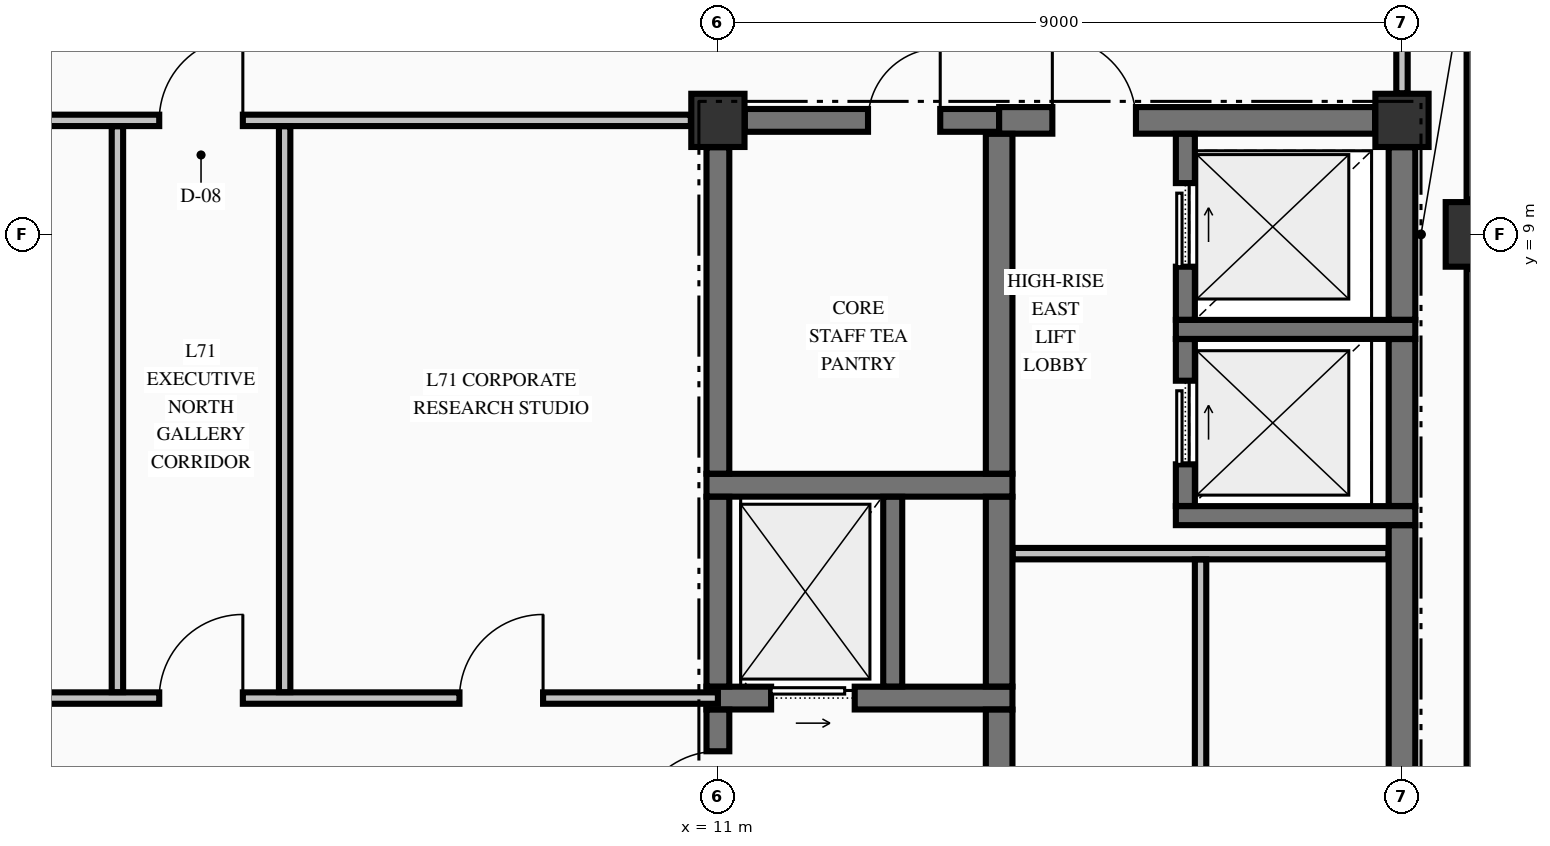
"""IFC4 building model, lengths in metres.
Left out: names, types, materials, properties, quantities, classifications, styles, units other than length and angle.
Written with IfcOpenShell. Run it as: python <this file> out.ifc"""

import sys

from ifc_helpers import new_model, si_unit, direction, frame, frame_2d, origin, origin_2d, place, context, subcontext, project, spatial, rectangle, extrude, element, fill, save


model = new_model("IFC4")
c1 = context("Model", 3, precision=1e-05, world=origin(), true_north=direction((0.0, 1.0)))
c2 = subcontext(c1, "Body", "Model", "MODEL_VIEW")
j1 = project(units=[si_unit("LENGTHUNIT", "METRE"), si_unit("PLANEANGLEUNIT", "RADIAN")], contexts=[c1])
p1 = place(None, origin())
s1 = spatial("IfcSite", under=j1, at=p1, CompositionType="ELEMENT")
p2 = place(p1, origin())
s2 = spatial("IfcBuilding", under=s1, at=p2, CompositionType="ELEMENT")
p3 = place(p2, frame((0.0, 0.0, 267.35)))
s3 = spatial("IfcBuildingStorey", under=s2, at=p3, CompositionType="ELEMENT", Elevation=267.35)
p4 = place(p3, frame((21.0, 9.0, -0.25), z_axis=(0.0, 0.0, 1.0), x_axis=(1.0, 0.0, 0.0)))
e1 = element("IfcColumn", 1, at=p4, inside=s3, PredefinedType="COLUMN", context=c2, shape_type="SweptSolid", body=[
    extrude(rectangle(XDim=0.85, YDim=0.85, at=origin_2d()), origin(), (0.0, 0.0, 1.0), 3.155),
])
for number, where, z_axis, x_axis in (
    (2, (11.0, 10.5, -0.25), (0.0, 0.0, 1.0), (1.0, 0.0, 0.0)),
    (3, (20.0, 10.5, -0.25), (0.0, 0.0, 1.0), (1.0, 0.0, 0.0)),
):
    element("IfcColumn", number, at=place(p3, frame(where, z_axis=z_axis, x_axis=x_axis)), inside=s3, PredefinedType="COLUMN", context=c2, shape_type="SweptSolid", body=[
        extrude(rectangle(XDim=0.7, YDim=0.7, at=origin_2d()), origin(), (0.0, 0.0, 1.0), 3.155),
    ])
for number, where, z_axis, x_axis in (
    (4, (21.0, 0.455, 0.0), (0.0, 0.0, 1.0), (0.0, 1.0, 0.0)),
    (5, (21.0, 9.455, 0.0), (0.0, 0.0, 1.0), (0.0, 1.0, 0.0)),
):
    element("IfcWall", number, at=place(p3, frame(where, z_axis=z_axis, x_axis=x_axis)), inside=s3, PredefinedType="STANDARD", context=c2, shape_type="SweptSolid", body=[
        extrude(rectangle(XDim=8.09, YDim=0.3, at=frame_2d((4.045, 0.0))), origin(), (0.0, 0.0, 1.0), 2.297),
    ])
p5 = place(p3, frame((10.85, 2.9, 0.0), z_axis=(0.0, 0.0, 1.0), x_axis=(1.0, 0.0, 0.0)))
e6 = element("IfcWall", 6, at=p5, inside=s3, PredefinedType="SHEAR", context=c2, shape_type="SweptSolid", body=[
    extrude(rectangle(XDim=4.025, YDim=0.3, at=frame_2d((2.012, 0.0))), origin(), (0.0, 0.0, 1.0), 2.905),
])
p6 = place(p5, frame((0.85, 0.0, 0.0)))
e7 = element("IfcOpeningElement", 7, at=p6, cuts=e6, PredefinedType="OPENING", context=c2, shape_type="SweptSolid", body=[
    extrude(rectangle(XDim=1.1, YDim=2.2, at=frame_2d((0.55, 1.1))), frame((0.0, 0.16, 0.0), z_axis=(0.0, -1.0, 0.0), x_axis=(1.0, 0.0, 0.0)), (0.0, 0.0, 1.0), 0.32),
])
p7 = place(p3, frame((17.025, 5.3, 0.0), z_axis=(0.0, 0.0, 1.0), x_axis=(1.0, 0.0, 0.0)))
e8 = element("IfcWall", 8, at=p7, inside=s3, PredefinedType="SOLIDWALL", context=c2, shape_type="SweptSolid", body=[
    extrude(rectangle(XDim=3.15, YDim=0.25, at=frame_2d((1.575, 0.0))), origin(), (0.0, 0.0, 1.0), 2.905),
])
p8 = place(p3, frame((10.85, 5.7, 0.0), z_axis=(0.0, 0.0, 1.0), x_axis=(1.0, 0.0, 0.0)))
e9 = element("IfcWall", 9, at=p8, inside=s3, PredefinedType="SHEAR", context=c2, shape_type="SweptSolid", body=[
    extrude(rectangle(XDim=4.025, YDim=0.3, at=frame_2d((2.012, 0.0))), origin(), (0.0, 0.0, 1.0), 2.905),
])
p9 = place(p3, frame((17.025, 7.75, 0.0), z_axis=(0.0, 0.0, 1.0), x_axis=(1.0, 0.0, 0.0)))
e10 = element("IfcWall", 10, at=p9, inside=s3, PredefinedType="SOLIDWALL", context=c2, shape_type="SweptSolid", body=[
    extrude(rectangle(XDim=3.15, YDim=0.25, at=frame_2d((1.575, 0.0))), origin(), (0.0, 0.0, 1.0), 2.905),
])
p10 = place(p3, frame((11.354, 10.5, 0.0), z_axis=(0.0, 0.0, 1.0), x_axis=(1.0, 0.0, 0.0)))
e11 = element("IfcWall", 11, at=p10, inside=s3, PredefinedType="SHEAR", context=c2, shape_type="SweptSolid", body=[
    extrude(rectangle(XDim=3.346, YDim=0.3, at=frame_2d((1.673, 0.0))), origin(), (0.0, 0.0, 1.0), 2.905),
])
p11 = place(p10, frame((1.621, 0.0, 0.0)))
e12 = element("IfcOpeningElement", 12, at=p11, cuts=e11, PredefinedType="OPENING", context=c2, shape_type="SweptSolid", body=[
    extrude(rectangle(XDim=0.95, YDim=2.15, at=frame_2d((0.475, 1.075))), frame((0.0, 0.16, 0.0), z_axis=(0.0, -1.0, 0.0), x_axis=(1.0, 0.0, 0.0)), (0.0, 0.0, 1.0), 0.32),
])
p12 = place(p3, frame((14.7, 10.5, 0.0), z_axis=(0.0, 0.0, 1.0), x_axis=(1.0, 0.0, 0.0)))
e13 = element("IfcWall", 13, at=p12, inside=s3, PredefinedType="SHEAR", context=c2, shape_type="SweptSolid", body=[
    extrude(rectangle(XDim=4.946, YDim=0.35, at=frame_2d((2.473, 0.0))), origin(), (0.0, 0.0, 1.0), 2.905),
])
p13 = place(p12, frame((0.7, 0.0, 0.0)))
e14 = element("IfcOpeningElement", 14, at=p13, cuts=e13, PredefinedType="OPENING", context=c2, shape_type="SweptSolid", body=[
    extrude(rectangle(XDim=1.1, YDim=2.15, at=frame_2d((0.55, 1.075))), frame((0.0, 0.185, 0.0), z_axis=(0.0, -1.0, 0.0), x_axis=(1.0, 0.0, 0.0)), (0.0, 0.0, 1.0), 0.37),
])
p14 = place(p3, frame((-11.0, 2.9, 0.0), z_axis=(0.0, 0.0, 1.0), x_axis=(1.0, 0.0, 0.0)))
e15 = element("IfcWall", 15, at=p14, inside=s3, PredefinedType="PARTITIONING", context=c2, shape_type="SweptSolid", body=[
    extrude(rectangle(XDim=22.0, YDim=0.15, at=frame_2d((11.0, 0.0))), origin(), (0.0, 0.0, 1.0), 2.905),
])
p15 = place(p14, frame((14.65, 0.0, 0.0)))
e16 = element("IfcOpeningElement", 16, at=p15, cuts=e15, PredefinedType="OPENING", context=c2, shape_type="SweptSolid", body=[
    extrude(rectangle(XDim=1.1, YDim=2.15, at=frame_2d((0.55, 1.075))), frame((0.0, 0.085, 0.0), z_axis=(0.0, -1.0, 0.0), x_axis=(1.0, 0.0, 0.0)), (0.0, 0.0, 1.0), 0.17),
])
p16 = place(p14, frame((6.525, 0.0, 0.0)))
e17 = element("IfcOpeningElement", 17, at=p16, cuts=e15, PredefinedType="OPENING", context=c2, shape_type="SweptSolid", body=[
    extrude(rectangle(XDim=1.05, YDim=2.15, at=frame_2d((0.525, 1.075))), frame((0.0, 0.085, 0.0), z_axis=(0.0, -1.0, 0.0), x_axis=(1.0, 0.0, 0.0)), (0.0, 0.0, 1.0), 0.17),
])
p17 = place(p14, frame((18.6, 0.0, 0.0)))
e18 = element("IfcOpeningElement", 18, at=p17, cuts=e15, PredefinedType="OPENING", context=c2, shape_type="SweptSolid", body=[
    extrude(rectangle(XDim=1.1, YDim=2.15, at=frame_2d((0.55, 1.075))), frame((0.0, 0.085, 0.0), z_axis=(0.0, -1.0, 0.0), x_axis=(1.0, 0.0, 0.0)), (0.0, 0.0, 1.0), 0.17),
])
p18 = place(p3, frame((14.878, 4.8, 0.0), z_axis=(0.0, 0.0, 1.0), x_axis=(1.0, 0.0, 0.0)))
e19 = element("IfcWall", 19, at=p18, inside=s3, PredefinedType="PARTITIONING", context=c2, shape_type="SweptSolid", body=[
    extrude(rectangle(XDim=4.944, YDim=0.15, at=frame_2d((2.472, 0.0))), origin(), (0.0, 0.0, 1.0), 2.905),
])
p19 = place(p3, frame((-10.644, 10.5, 0.0), z_axis=(0.0, 0.0, 1.0), x_axis=(1.0, 0.0, 0.0)))
e20 = element("IfcWall", 20, at=p19, inside=s3, PredefinedType="PARTITIONING", context=c2, shape_type="SweptSolid", body=[
    extrude(rectangle(XDim=21.288, YDim=0.15, at=frame_2d((10.644, 0.0))), origin(), (0.0, 0.0, 1.0), 2.905),
])
p20 = place(p19, frame((14.294, 0.0, 0.0)))
e21 = element("IfcOpeningElement", 21, at=p20, cuts=e20, PredefinedType="OPENING", context=c2, shape_type="SweptSolid", body=[
    extrude(rectangle(XDim=1.1, YDim=2.15, at=frame_2d((0.55, 1.075))), frame((0.0, 0.085, 0.0), z_axis=(0.0, -1.0, 0.0), x_axis=(1.0, 0.0, 0.0)), (0.0, 0.0, 1.0), 0.17),
])
p21 = place(p3, frame((11.0, 0.354, 0.0), z_axis=(0.0, 0.0, 1.0), x_axis=(0.0, 1.0, 0.0)))
e22 = element("IfcWall", 22, at=p21, inside=s3, PredefinedType="SHEAR", context=c2, shape_type="SweptSolid", body=[
    extrude(rectangle(XDim=2.394, YDim=0.3, at=frame_2d((1.197, 0.0))), origin(), (0.0, 0.0, 1.0), 2.905),
])
p22 = place(p21, frame((0.746, 0.0, 0.0)))
e23 = element("IfcOpeningElement", 23, at=p22, cuts=e22, PredefinedType="OPENING", context=c2, shape_type="SweptSolid", body=[
    extrude(rectangle(XDim=1.1, YDim=2.15, at=frame_2d((0.55, 1.075))), frame((0.0, 0.16, 0.0), z_axis=(0.0, -1.0, 0.0), x_axis=(1.0, 0.0, 0.0)), (0.0, 0.0, 1.0), 0.32),
])
p23 = place(p3, frame((11.0, 3.052, 0.0), z_axis=(0.0, 0.0, 1.0), x_axis=(0.0, 1.0, 0.0)))
e24 = element("IfcWall", 24, at=p23, inside=s3, PredefinedType="SHEAR", context=c2, shape_type="SweptSolid", body=[
    extrude(rectangle(XDim=2.496, YDim=0.3, at=frame_2d((1.248, 0.0))), origin(), (0.0, 0.0, 1.0), 2.905),
])
p24 = place(p3, frame((11.0, 5.852, 0.0), z_axis=(0.0, 0.0, 1.0), x_axis=(0.0, 1.0, 0.0)))
e25 = element("IfcWall", 25, at=p24, inside=s3, PredefinedType="SHEAR", context=c2, shape_type="SweptSolid", body=[
    extrude(rectangle(XDim=4.294, YDim=0.3, at=frame_2d((2.147, 0.0))), origin(), (0.0, 0.0, 1.0), 2.905),
])
p25 = place(p3, frame((13.3, 3.052, 0.0), z_axis=(0.0, 0.0, 1.0), x_axis=(0.0, 1.0, 0.0)))
e26 = element("IfcWall", 26, at=p25, inside=s3, PredefinedType="SOLIDWALL", context=c2, shape_type="SweptSolid", body=[
    extrude(rectangle(XDim=2.496, YDim=0.25, at=frame_2d((1.248, 0.0))), origin(), (0.0, 0.0, 1.0), 2.905),
])
p26 = place(p3, frame((14.7, -0.098, 0.0), z_axis=(0.0, 0.0, 1.0), x_axis=(0.0, 1.0, 0.0)))
e27 = element("IfcWall", 27, at=p26, inside=s3, PredefinedType="SHEAR", context=c2, shape_type="SweptSolid", body=[
    extrude(rectangle(XDim=2.846, YDim=0.35, at=frame_2d((1.423, 0.0))), origin(), (0.0, 0.0, 1.0), 2.905),
])
p27 = place(p3, frame((14.7, 3.052, 0.0), z_axis=(0.0, 0.0, 1.0), x_axis=(0.0, 1.0, 0.0)))
e28 = element("IfcWall", 28, at=p27, inside=s3, PredefinedType="SHEAR", context=c2, shape_type="SweptSolid", body=[
    extrude(rectangle(XDim=2.496, YDim=0.35, at=frame_2d((1.248, 0.0))), origin(), (0.0, 0.0, 1.0), 2.905),
])
p28 = place(p3, frame((14.7, 5.852, 0.0), z_axis=(0.0, 0.0, 1.0), x_axis=(0.0, 1.0, 0.0)))
e29 = element("IfcWall", 29, at=p28, inside=s3, PredefinedType="SHEAR", context=c2, shape_type="SweptSolid", body=[
    extrude(rectangle(XDim=4.471, YDim=0.35, at=frame_2d((2.235, 0.0))), origin(), (0.0, 0.0, 1.0), 2.905),
])
p29 = place(p3, frame((17.15, 5.427, 0.0), z_axis=(0.0, 0.0, 1.0), x_axis=(0.0, 1.0, 0.0)))
e30 = element("IfcWall", 30, at=p29, inside=s3, PredefinedType="SOLIDWALL", context=c2, shape_type="SweptSolid", body=[
    extrude(rectangle(XDim=2.196, YDim=0.25, at=frame_2d((1.098, 0.0))), origin(), (0.0, 0.0, 1.0), 2.905),
])
p30 = place(p29, frame((0.548, 0.0, 0.0)))
e31 = element("IfcOpeningElement", 31, at=p30, cuts=e30, PredefinedType="OPENING", context=c2, shape_type="SweptSolid", body=[
    extrude(rectangle(XDim=1.1, YDim=2.2, at=frame_2d((0.55, 1.1))), frame((0.0, 0.135, 0.0), z_axis=(0.0, -1.0, 0.0), x_axis=(1.0, 0.0, 0.0)), (0.0, 0.0, 1.0), 0.27),
])
p31 = place(p3, frame((17.15, 7.877, 0.0), z_axis=(0.0, 0.0, 1.0), x_axis=(0.0, 1.0, 0.0)))
e32 = element("IfcWall", 32, at=p31, inside=s3, PredefinedType="SOLIDWALL", context=c2, shape_type="SweptSolid", body=[
    extrude(rectangle(XDim=2.446, YDim=0.25, at=frame_2d((1.223, 0.0))), origin(), (0.0, 0.0, 1.0), 2.905),
])
p32 = place(p31, frame((0.698, 0.0, 0.0)))
e33 = element("IfcOpeningElement", 33, at=p32, cuts=e32, PredefinedType="OPENING", context=c2, shape_type="SweptSolid", body=[
    extrude(rectangle(XDim=1.1, YDim=2.2, at=frame_2d((0.55, 1.1))), frame((0.0, 0.135, 0.0), z_axis=(0.0, -1.0, 0.0), x_axis=(1.0, 0.0, 0.0)), (0.0, 0.0, 1.0), 0.27),
])
p33 = place(p3, frame((20.0, -9.596, 0.0), z_axis=(0.0, 0.0, 1.0), x_axis=(0.0, 1.0, 0.0)))
e34 = element("IfcWall", 34, at=p33, inside=s3, PredefinedType="SHEAR", context=c2, shape_type="SweptSolid", body=[
    extrude(rectangle(XDim=14.769, YDim=0.35, at=frame_2d((7.385, 0.0))), origin(), (0.0, 0.0, 1.0), 2.905),
])
p34 = place(p3, frame((20.0, 5.427, 0.0), z_axis=(0.0, 0.0, 1.0), x_axis=(0.0, 1.0, 0.0)))
e35 = element("IfcWall", 35, at=p34, inside=s3, PredefinedType="SHEAR", context=c2, shape_type="SweptSolid", body=[
    extrude(rectangle(XDim=2.196, YDim=0.35, at=frame_2d((1.098, 0.0))), origin(), (0.0, 0.0, 1.0), 2.905),
])
p35 = place(p3, frame((20.0, 7.877, 0.0), z_axis=(0.0, 0.0, 1.0), x_axis=(0.0, 1.0, 0.0)))
e36 = element("IfcWall", 36, at=p35, inside=s3, PredefinedType="SHEAR", context=c2, shape_type="SweptSolid", body=[
    extrude(rectangle(XDim=2.269, YDim=0.35, at=frame_2d((1.135, 0.0))), origin(), (0.0, 0.0, 1.0), 2.905),
])
for number, where, z_axis, x_axis in (
    (37, (3.1, 2.978, 0.0), (0.0, 0.0, 1.0), (0.0, 1.0, 0.0)),
    (38, (5.3, 2.978, 0.0), (0.0, 0.0, 1.0), (0.0, 1.0, 0.0)),
):
    element("IfcWall", number, at=place(p3, frame(where, z_axis=z_axis, x_axis=x_axis)), inside=s3, PredefinedType="PARTITIONING", context=c2, shape_type="SweptSolid", body=[
        extrude(rectangle(XDim=7.444, YDim=0.15, at=frame_2d((3.722, 0.0))), origin(), (0.0, 0.0, 1.0), 2.905),
    ])
p36 = place(p3, frame((17.35, -9.772, 0.0), z_axis=(0.0, 0.0, 1.0), x_axis=(0.0, 1.0, 0.0)))
e39 = element("IfcWall", 39, at=p36, inside=s3, PredefinedType="PARTITIONING", context=c2, shape_type="SweptSolid", body=[
    extrude(rectangle(XDim=14.494, YDim=0.15, at=frame_2d((7.247, 0.0))), origin(), (0.0, 0.0, 1.0), 2.905),
])
p37 = place(p3, frame((20.0, 10.856, 0.0), z_axis=(0.0, 0.0, 1.0), x_axis=(0.0, 1.0, 0.0)))
e40 = element("IfcWall", 40, at=p37, inside=s3, PredefinedType="PARTITIONING", context=c2, shape_type="SweptSolid", body=[
    extrude(rectangle(XDim=2.016, YDim=0.15, at=frame_2d((1.008, 0.0))), origin(), (0.0, 0.0, 1.0), 2.495),
])
p38 = place(p22, origin())
e41 = element("IfcDoor", 41, at=p38, inside=s3, OperationType="SINGLE_SWING_LEFT", PredefinedType="DOOR", context=c2, shape_type="SweptSolid", body=[
    extrude(rectangle(XDim=1.1, YDim=2.15, at=frame_2d((0.55, 1.075))), frame((0.0, 0.025, 0.0), z_axis=(0.0, -1.0, 0.0), x_axis=(1.0, 0.0, 0.0)), (0.0, 0.0, 1.0), 0.05),
])
fill(e23, e41)
p39 = place(p6, origin())
e42 = element("IfcDoor", 42, at=p39, inside=s3, OperationType="SLIDING_TO_RIGHT", PredefinedType="DOOR", context=c2, shape_type="SweptSolid", body=[
    extrude(rectangle(XDim=1.1, YDim=2.2, at=frame_2d((0.55, 1.1))), frame((0.0, 0.025, 0.0), z_axis=(0.0, -1.0, 0.0), x_axis=(1.0, 0.0, 0.0)), (0.0, 0.0, 1.0), 0.05),
])
fill(e7, e42)
p40 = place(p11, origin())
e43 = element("IfcDoor", 43, at=p40, inside=s3, OperationType="SINGLE_SWING_RIGHT", PredefinedType="DOOR", context=c2, shape_type="SweptSolid", body=[
    extrude(rectangle(XDim=0.95, YDim=2.15, at=frame_2d((0.475, 1.075))), frame((0.0, 0.025, 0.0), z_axis=(0.0, -1.0, 0.0), x_axis=(1.0, 0.0, 0.0)), (0.0, 0.0, 1.0), 0.05),
])
fill(e12, e43)
p41 = place(p30, origin())
e44 = element("IfcDoor", 44, at=p41, inside=s3, OperationType="SLIDING_TO_RIGHT", PredefinedType="DOOR", context=c2, shape_type="SweptSolid", body=[
    extrude(rectangle(XDim=1.1, YDim=2.2, at=frame_2d((0.55, 1.1))), frame((0.0, 0.025, 0.0), z_axis=(0.0, -1.0, 0.0), x_axis=(1.0, 0.0, 0.0)), (0.0, 0.0, 1.0), 0.05),
])
fill(e31, e44)
p42 = place(p32, origin())
e45 = element("IfcDoor", 45, at=p42, inside=s3, OperationType="SLIDING_TO_RIGHT", PredefinedType="DOOR", context=c2, shape_type="SweptSolid", body=[
    extrude(rectangle(XDim=1.1, YDim=2.2, at=frame_2d((0.55, 1.1))), frame((0.0, 0.025, 0.0), z_axis=(0.0, -1.0, 0.0), x_axis=(1.0, 0.0, 0.0)), (0.0, 0.0, 1.0), 0.05),
])
fill(e33, e45)
p43 = place(p13, origin())
e46 = element("IfcDoor", 46, at=p43, inside=s3, OperationType="SINGLE_SWING_LEFT", PredefinedType="DOOR", context=c2, shape_type="SweptSolid", body=[
    extrude(rectangle(XDim=1.1, YDim=2.15, at=frame_2d((0.55, 1.075))), frame((0.0, 0.025, 0.0), z_axis=(0.0, -1.0, 0.0), x_axis=(1.0, 0.0, 0.0)), (0.0, 0.0, 1.0), 0.05),
])
fill(e14, e46)
p44 = place(p20, origin())
e47 = element("IfcDoor", 47, at=p44, inside=s3, OperationType="SINGLE_SWING_RIGHT", PredefinedType="DOOR", context=c2, shape_type="SweptSolid", body=[
    extrude(rectangle(XDim=1.1, YDim=2.15, at=frame_2d((0.55, 1.075))), frame((0.0, 0.025, 0.0), z_axis=(0.0, -1.0, 0.0), x_axis=(1.0, 0.0, 0.0)), (0.0, 0.0, 1.0), 0.05),
])
fill(e21, e47)
p45 = place(p15, origin())
e48 = element("IfcDoor", 48, at=p45, inside=s3, OperationType="SINGLE_SWING_RIGHT", PredefinedType="DOOR", context=c2, shape_type="SweptSolid", body=[
    extrude(rectangle(XDim=1.1, YDim=2.15, at=frame_2d((0.55, 1.075))), frame((0.0, 0.025, 0.0), z_axis=(0.0, -1.0, 0.0), x_axis=(1.0, 0.0, 0.0)), (0.0, 0.0, 1.0), 0.05),
])
fill(e16, e48)
p46 = place(p17, origin())
e49 = element("IfcDoor", 49, at=p46, inside=s3, OperationType="SINGLE_SWING_RIGHT", PredefinedType="DOOR", context=c2, shape_type="SweptSolid", body=[
    extrude(rectangle(XDim=1.1, YDim=2.15, at=frame_2d((0.55, 1.075))), frame((0.0, 0.025, 0.0), z_axis=(0.0, -1.0, 0.0), x_axis=(1.0, 0.0, 0.0)), (0.0, 0.0, 1.0), 0.05),
])
fill(e18, e49)
save(model, sys.argv[1])
